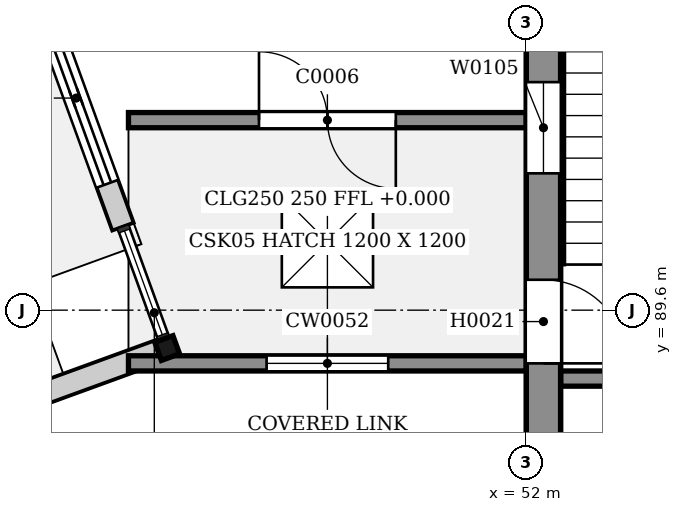
"""IFC4 building model, lengths in metres.
Left out: names, types, materials, properties, quantities, classifications, styles, units other than length and angle.
Written with IfcOpenShell. Run it as: python <this file> out.ifc"""

import sys

from ifc_helpers import new_model, si_unit, direction, frame, frame_2d, origin, origin_2d, place, context, subcontext, project, spatial, rectangle, hollow_rectangle, extrude, element, fill, save


model = new_model("IFC4")
c1 = context("Model", 3, precision=1e-05, world=origin(), true_north=direction((0.0, 1.0)))
c2 = subcontext(c1, "Body", "Model", "MODEL_VIEW")
j1 = project(units=[si_unit("LENGTHUNIT", "METRE"), si_unit("PLANEANGLEUNIT", "RADIAN")], contexts=[c1])
p1 = place(None, origin())
s1 = spatial("IfcSite", under=j1, at=p1, CompositionType="ELEMENT")
p2 = place(p1, origin())
s2 = spatial("IfcBuilding", under=s1, at=p2, CompositionType="ELEMENT")
p3 = place(p2, origin())
s3 = spatial("IfcBuildingStorey", under=s2, at=p3, CompositionType="ELEMENT", Elevation=0.0)
p4 = place(p3, frame((52.225, 96.0, -1.6), z_axis=(0.0, 0.0, 1.0), x_axis=(0.0, -1.0, 0.0)))
e1 = element("IfcWall", 1, at=p4, inside=s3, PredefinedType="ELEMENTEDWALL", context=c2, shape_type="SweptSolid", body=[
    extrude(rectangle(XDim=12.0, YDim=0.45, at=frame_2d((6.0, 0.0))), origin(), (0.0, 0.0, 1.0), 1.35),
])
p5 = place(p3, frame((52.225, 96.0, 0.0), z_axis=(0.0, 0.0, 1.0), x_axis=(0.0, -1.0, 0.0)))
e2 = element("IfcWall", 2, at=p5, inside=s3, PredefinedType="ELEMENTEDWALL", context=c2, shape_type="SweptSolid", body=[
    extrude(rectangle(XDim=12.0, YDim=0.45, at=frame_2d((6.0, 0.0))), origin(), (0.0, 0.0, 1.0), 5.0),
])
p6 = place(p5, frame((6.0, 0.0, 0.0)))
e3 = element("IfcOpeningElement", 3, at=p6, cuts=e2, PredefinedType="OPENING", context=c2, shape_type="SweptSolid", body=[
    extrude(rectangle(XDim=1.1, YDim=2.1, at=frame_2d((0.55, 1.05))), frame((0.0, 0.235, 0.0), z_axis=(0.0, -1.0, 0.0), x_axis=(1.0, 0.0, 0.0)), (0.0, 0.0, 1.0), 0.47),
])
p7 = place(p5, frame((3.4, 0.0, 0.6)))
e4 = element("IfcOpeningElement", 4, at=p7, cuts=e2, PredefinedType="OPENING", context=c2, shape_type="SweptSolid", body=[
    extrude(rectangle(XDim=1.2, YDim=3.0, at=frame_2d((0.6, 1.5))), frame((0.0, 0.235, 0.0), z_axis=(0.0, -1.0, 0.0), x_axis=(1.0, 0.0, 0.0)), (0.0, 0.0, 1.0), 0.47),
])
p8 = place(p3, frame((47.274, 89.102, 0.0), z_axis=(0.0, 0.0, 1.0), x_axis=(0.939692620786, 0.342020143326, 0.0)))
e5 = element("IfcColumn", 5, at=p8, inside=s3, PredefinedType="COLUMN", context=c2, shape_type="SweptSolid", body=[
    extrude(hollow_rectangle(XDim=0.254, YDim=0.254, WallThickness=0.012, at=origin_2d()), origin(), (0.0, 0.0, 1.0), 5.0),
])
p9 = place(p3, frame((43.516, 87.733, 0.0), z_axis=(0.0, 0.0, 1.0), x_axis=(0.939686455819, 0.342037080957, 0.0)))
e6 = element("IfcWall", 6, at=p9, inside=s3, PredefinedType="ELEMENTEDWALL", context=c2, shape_type="SweptSolid", body=[
    extrude(rectangle(XDim=4.0, YDim=0.3, at=frame_2d((2.0, 0.0))), origin(), (0.0, 0.0, 1.0), 4.303),
])
p10 = place(p3, frame((46.693, 90.699, 0.0), z_axis=(0.0, 0.0, 1.0), x_axis=(-0.342009868999, 0.939696360271, 0.0)))
e7 = element("IfcWall", 7, at=p10, inside=s3, PredefinedType="ELEMENTEDWALL", context=c2, shape_type="SweptSolid", body=[
    extrude(rectangle(XDim=3.6, YDim=0.3, at=frame_2d((1.8, 0.0))), origin(), (0.0, 0.0, 1.0), 4.303),
])
p11 = place(p10, frame((0.6, 0.0, 0.0)))
e8 = element("IfcOpeningElement", 8, at=p11, cuts=e7, PredefinedType="OPENING", context=c2, shape_type="SweptSolid", body=[
    extrude(rectangle(XDim=2.4, YDim=2.4, at=frame_2d((1.2, 1.2))), frame((0.0, 0.16, 0.0), z_axis=(0.0, -1.0, 0.0), x_axis=(1.0, 0.0, 0.0)), (0.0, 0.0, 1.0), 0.32),
])
p12 = place(p3, frame((46.765, 92.1, 0.0), z_axis=(0.0, 0.0, 1.0), x_axis=(1.0, 0.0, 0.0)))
e9 = element("IfcWall", 9, at=p12, inside=s3, PredefinedType="ELEMENTEDWALL", context=c2, shape_type="SweptSolid", body=[
    extrude(rectangle(XDim=5.235, YDim=0.2, at=frame_2d((2.617, 0.0))), origin(), (0.0, 0.0, 1.0), 3.2),
])
p13 = place(p12, frame((1.717, 0.0, 0.0)))
e10 = element("IfcOpeningElement", 10, at=p13, cuts=e9, PredefinedType="OPENING", context=c2, shape_type="SweptSolid", body=[
    extrude(rectangle(XDim=1.8, YDim=2.4, at=frame_2d((0.9, 1.2))), frame((0.0, 0.11, 0.0), z_axis=(0.0, -1.0, 0.0), x_axis=(1.0, 0.0, 0.0)), (0.0, 0.0, 1.0), 0.22),
])
p14 = place(p3, frame((46.765, 88.9, 0.0), z_axis=(0.0, 0.0, 1.0), x_axis=(1.0, 0.0, 0.0)))
e11 = element("IfcWall", 11, at=p14, inside=s3, PredefinedType="ELEMENTEDWALL", context=c2, shape_type="SweptSolid", body=[
    extrude(rectangle(XDim=5.235, YDim=0.2, at=frame_2d((2.617, 0.0))), origin(), (0.0, 0.0, 1.0), 3.2),
])
p15 = place(p14, frame((1.817, 0.0, 0.9)))
e12 = element("IfcOpeningElement", 12, at=p15, cuts=e11, PredefinedType="OPENING", context=c2, shape_type="SweptSolid", body=[
    extrude(rectangle(XDim=1.6, YDim=1.6, at=frame_2d((0.8, 0.8))), frame((0.0, 0.11, 0.0), z_axis=(0.0, -1.0, 0.0), x_axis=(1.0, 0.0, 0.0)), (0.0, 0.0, 1.0), 0.22),
])
p16 = place(p3, frame((52.45, 88.7, 0.0), z_axis=(0.0, 0.0, 1.0), x_axis=(1.0, 0.0, 0.0)))
e13 = element("IfcWall", 13, at=p16, inside=s3, PredefinedType="SOLIDWALL", context=c2, shape_type="SweptSolid", body=[
    extrude(rectangle(XDim=2.95, YDim=0.2, at=frame_2d((1.475, 0.0))), origin(), (0.0, 0.0, 1.0), 5.0),
])
p17 = place(p16, frame((0.65, 0.0, 0.0)))
e14 = element("IfcOpeningElement", 14, at=p17, cuts=e13, PredefinedType="OPENING", context=c2, shape_type="SweptSolid", body=[
    extrude(rectangle(XDim=1.1, YDim=2.1, at=frame_2d((0.55, 1.05))), frame((0.0, 0.11, 0.0), z_axis=(0.0, -1.0, 0.0), x_axis=(1.0, 0.0, 0.0)), (0.0, 0.0, 1.0), 0.22),
])
p18 = place(p3, frame((0.0, 0.0, 3.2)))
p19 = place(p18, frame((49.383, 90.5, 0.0)))
p20 = place(p19, frame((0.0, 0.0, 0.15)))
e15 = element("IfcWindow", 15, at=p20, inside=s3, PartitioningType="SINGLE_PANEL", PredefinedType="SKYLIGHT", context=c2, shape_type="SweptSolid", body=[
    extrude(rectangle(XDim=1.2, YDim=1.2, at=origin_2d()), origin(), (0.0, 0.0, 1.0), 0.05),
])
p21 = place(p11, origin())
e16 = element("IfcDoor", 16, at=p21, inside=s3, OperationType="DOUBLE_DOOR_SLIDING", PredefinedType="DOOR", context=c2, shape_type="SweptSolid", body=[
    extrude(rectangle(XDim=2.4, YDim=2.4, at=frame_2d((1.2, 1.2))), frame((0.0, 0.025, 0.0), z_axis=(0.0, -1.0, 0.0), x_axis=(1.0, 0.0, 0.0)), (0.0, 0.0, 1.0), 0.05),
])
fill(e8, e16)
p22 = place(p13, origin())
e17 = element("IfcDoor", 17, at=p22, inside=s3, OperationType="DOUBLE_DOOR_SINGLE_SWING", PredefinedType="DOOR", context=c2, shape_type="SweptSolid", body=[
    extrude(rectangle(XDim=1.8, YDim=2.4, at=frame_2d((0.9, 1.2))), frame((0.0, 0.025, 0.0), z_axis=(0.0, -1.0, 0.0), x_axis=(1.0, 0.0, 0.0)), (0.0, 0.0, 1.0), 0.05),
])
fill(e10, e17)
p23 = place(p15, origin())
e18 = element("IfcWindow", 18, at=p23, inside=s3, PartitioningType="SINGLE_PANEL", PredefinedType="WINDOW", context=c2, shape_type="SweptSolid", body=[
    extrude(rectangle(XDim=1.6, YDim=1.6, at=frame_2d((0.8, 0.8))), frame((0.0, 0.03, 0.0), z_axis=(0.0, -1.0, 0.0), x_axis=(1.0, 0.0, 0.0)), (0.0, 0.0, 1.0), 0.06),
])
fill(e12, e18)
p24 = place(p6, origin())
e19 = element("IfcDoor", 19, at=p24, inside=s3, OperationType="SINGLE_SWING_RIGHT", PredefinedType="DOOR", context=c2, shape_type="SweptSolid", body=[
    extrude(rectangle(XDim=1.1, YDim=2.1, at=frame_2d((0.55, 1.05))), frame((0.0, 0.025, 0.0), z_axis=(0.0, -1.0, 0.0), x_axis=(1.0, 0.0, 0.0)), (0.0, 0.0, 1.0), 0.05),
])
fill(e3, e19)
p25 = place(p7, origin())
e20 = element("IfcWindow", 20, at=p25, inside=s3, PartitioningType="SINGLE_PANEL", PredefinedType="WINDOW", context=c2, shape_type="SweptSolid", body=[
    extrude(rectangle(XDim=1.2, YDim=3.0, at=frame_2d((0.6, 1.5))), frame((0.0, 0.03, 0.0), z_axis=(0.0, -1.0, 0.0), x_axis=(1.0, 0.0, 0.0)), (0.0, 0.0, 1.0), 0.06),
])
fill(e4, e20)
save(model, sys.argv[1])
